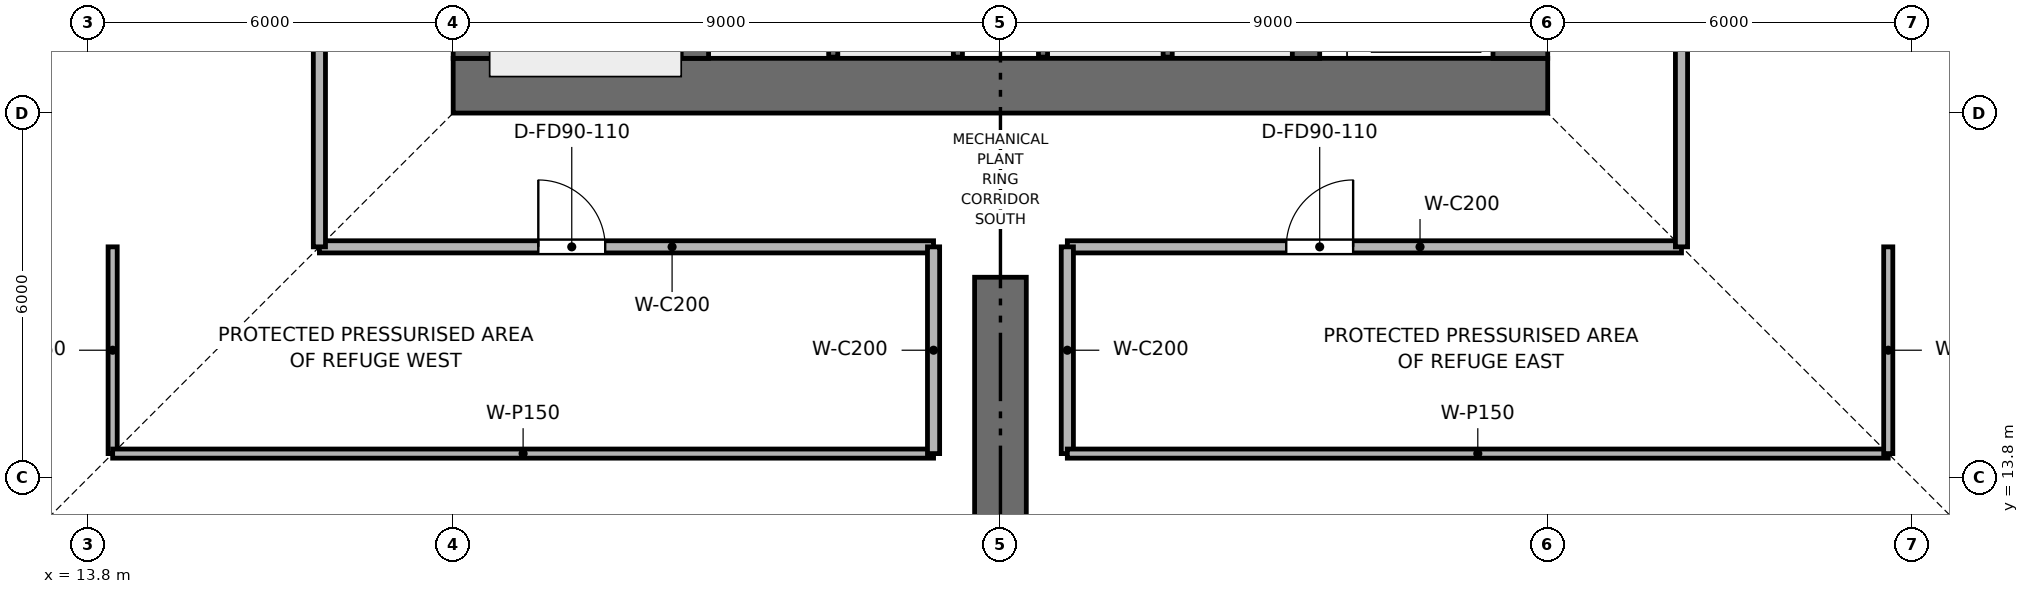
"""IFC4 building model, lengths in metres.
Left out: names, types, materials, properties, quantities, classifications, styles, units other than length and angle.
Written with IfcOpenShell. Run it as: python <this file> out.ifc"""

import sys

from ifc_helpers import new_model, si_unit, direction, frame, frame_2d, origin, place, context, subcontext, project, spatial, rectangle, extrude, element, fill, save


model = new_model("IFC4")
c1 = context("Model", 3, precision=1e-05, world=origin(), true_north=direction((0.0, 1.0)))
c2 = subcontext(c1, "Body", "Model", "MODEL_VIEW")
j1 = project(units=[si_unit("LENGTHUNIT", "METRE"), si_unit("PLANEANGLEUNIT", "RADIAN")], contexts=[c1])
p1 = place(None, origin())
s1 = spatial("IfcSite", under=j1, at=p1, CompositionType="ELEMENT")
p2 = place(p1, origin())
s2 = spatial("IfcBuilding", under=s1, at=p2, CompositionType="ELEMENT")
p3 = place(p2, frame((0.0, 0.0, 108.0)))
s3 = spatial("IfcBuildingStorey", under=s2, at=p3, CompositionType="ELEMENT", Elevation=108.0)
p4 = place(p3, frame((19.8, 20.25, 0.0), z_axis=(0.0, 0.0, 1.0), x_axis=(1.0, 0.0, 0.0)))
e1 = element("IfcWall", 1, at=p4, inside=s3, PredefinedType="SHEAR", context=c2, shape_type="SweptSolid", body=[
    extrude(rectangle(XDim=18.0, YDim=0.9, at=frame_2d((9.0, 0.0))), origin(), (0.0, 0.0, 1.0), 5.4),
])
p5 = place(p3, frame((20.25, 20.7, 0.0), z_axis=(0.0, 0.0, 1.0), x_axis=(0.0, 1.0, 0.0)))
e2 = element("IfcWall", 2, at=p5, inside=s3, PredefinedType="SHEAR", context=c2, shape_type="SweptSolid", body=[
    extrude(rectangle(XDim=16.2, YDim=0.9, at=frame_2d((8.1, 0.0))), origin(), (0.0, 0.0, 1.0), 5.4),
])
p6 = place(p5, frame((10.1, 0.0, 0.0)))
e3 = element("IfcOpeningElement", 3, at=p6, cuts=e2, PredefinedType="OPENING", context=c2, shape_type="SweptSolid", body=[
    extrude(rectangle(XDim=1.1, YDim=2.15, at=frame_2d((0.55, 1.075))), frame((0.0, 0.46, 0.0), z_axis=(0.0, -1.0, 0.0), x_axis=(1.0, 0.0, 0.0)), (0.0, 0.0, 1.0), 0.92),
])
p7 = place(p3, frame((37.35, 20.7, 0.0), z_axis=(0.0, 0.0, 1.0), x_axis=(0.0, 1.0, 0.0)))
e4 = element("IfcWall", 4, at=p7, inside=s3, PredefinedType="SHEAR", context=c2, shape_type="SweptSolid", body=[
    extrude(rectangle(XDim=16.2, YDim=0.9, at=frame_2d((8.1, 0.0))), origin(), (0.0, 0.0, 1.0), 5.4),
])
p8 = place(p7, frame((4.6, 0.0, 0.0)))
e5 = element("IfcOpeningElement", 5, at=p8, cuts=e4, PredefinedType="OPENING", context=c2, shape_type="SweptSolid", body=[
    extrude(rectangle(XDim=1.1, YDim=2.15, at=frame_2d((0.55, 1.075))), frame((0.0, 0.46, 0.0), z_axis=(0.0, -1.0, 0.0), x_axis=(1.0, 0.0, 0.0)), (0.0, 0.0, 1.0), 0.92),
])
for number, where, z_axis, x_axis in (
    (6, (23.775, 20.7, 0.0), (0.0, 0.0, 1.0), (0.0, 1.0, 0.0)),
    (7, (33.825, 20.7, 0.0), (0.0, 0.0, 1.0), (0.0, 1.0, 0.0)),
):
    element("IfcWall", number, at=place(p3, frame(where, z_axis=z_axis, x_axis=x_axis)), inside=s3, PredefinedType="SHEAR", context=c2, shape_type="SweptSolid", body=[
        extrude(rectangle(XDim=16.2, YDim=0.45, at=frame_2d((8.1, 0.0))), origin(), (0.0, 0.0, 1.0), 5.4),
    ])
p9 = place(p3, frame((28.8, 17.1, 0.0), z_axis=(0.0, 0.0, 1.0), x_axis=(0.0, -1.0, 0.0)))
e8 = element("IfcWall", 8, at=p9, inside=s3, PredefinedType="SHEAR", context=c2, shape_type="SweptSolid", body=[
    extrude(rectangle(XDim=12.55, YDim=0.85, at=frame_2d((6.275, 0.0))), origin(), (0.0, 0.0, 1.0), 5.15),
])
for number, where, z_axis, x_axis in (
    (9, (26.05, 20.72, 0.0), (0.0, 0.0, 1.0), (0.0, 1.0, 0.0)),
    (10, (28.1, 20.72, 0.0), (0.0, 0.0, 1.0), (0.0, 1.0, 0.0)),
    (11, (29.5, 20.72, 0.0), (0.0, 0.0, 1.0), (0.0, 1.0, 0.0)),
    (12, (31.55, 20.72, 0.0), (0.0, 0.0, 1.0), (0.0, 1.0, 0.0)),
):
    element("IfcWall", number, at=place(p3, frame(where, z_axis=z_axis, x_axis=x_axis)), inside=s3, PredefinedType="SHEAR", context=c2, shape_type="SweptSolid", body=[
        extrude(rectangle(XDim=2.26, YDim=0.15, at=frame_2d((1.13, 0.0))), origin(), (0.0, 0.0, 1.0), 5.15),
    ])
p10 = place(p3, frame((17.6, 17.6, 0.0), z_axis=(0.0, 0.0, 1.0), x_axis=(1.0, 0.0, 0.0)))
e13 = element("IfcWall", 13, at=p10, inside=s3, PredefinedType="PARTITIONING", context=c2, shape_type="SweptSolid", body=[
    extrude(rectangle(XDim=10.1, YDim=0.2, at=frame_2d((5.05, 0.0))), origin(), (0.0, 0.0, 1.0), 4.685),
])
p11 = place(p10, frame((3.6, 0.0, 0.0)))
e14 = element("IfcOpeningElement", 14, at=p11, cuts=e13, PredefinedType="OPENING", context=c2, shape_type="SweptSolid", body=[
    extrude(rectangle(XDim=1.1, YDim=2.15, at=frame_2d((0.55, 1.075))), frame((0.0, 0.11, 0.0), z_axis=(0.0, -1.0, 0.0), x_axis=(1.0, 0.0, 0.0)), (0.0, 0.0, 1.0), 0.22),
])
p12 = place(p3, frame((29.9, 17.6, 0.0), z_axis=(0.0, 0.0, 1.0), x_axis=(1.0, 0.0, 0.0)))
e15 = element("IfcWall", 15, at=p12, inside=s3, PredefinedType="PARTITIONING", context=c2, shape_type="SweptSolid", body=[
    extrude(rectangle(XDim=10.1, YDim=0.2, at=frame_2d((5.05, 0.0))), origin(), (0.0, 0.0, 1.0), 4.685),
])
p13 = place(p12, frame((3.6, 0.0, 0.0)))
e16 = element("IfcOpeningElement", 16, at=p13, cuts=e15, PredefinedType="OPENING", context=c2, shape_type="SweptSolid", body=[
    extrude(rectangle(XDim=1.1, YDim=2.15, at=frame_2d((0.55, 1.075))), frame((0.0, 0.11, 0.0), z_axis=(0.0, -1.0, 0.0), x_axis=(1.0, 0.0, 0.0)), (0.0, 0.0, 1.0), 0.22),
])
for number, where, z_axis, x_axis in (
    (17, (17.6, 17.6, 0.0), (0.0, 0.0, 1.0), (0.0, 1.0, 0.0)),
    (18, (40.0, 17.6, 0.0), (0.0, 0.0, 1.0), (0.0, 1.0, 0.0)),
):
    element("IfcWall", number, at=place(p3, frame(where, z_axis=z_axis, x_axis=x_axis)), inside=s3, PredefinedType="PARTITIONING", context=c2, shape_type="SweptSolid", body=[
        extrude(rectangle(XDim=10.1, YDim=0.2, at=frame_2d((5.05, 0.0))), origin(), (0.0, 0.0, 1.0), 4.685),
    ])
p14 = place(p3, frame((14.2, 14.2, 0.0), z_axis=(0.0, 0.0, 1.0), x_axis=(0.0, 1.0, 0.0)))
e19 = element("IfcWall", 19, at=p14, inside=s3, PredefinedType="PARTITIONING", context=c2, shape_type="SweptSolid", body=[
    extrude(rectangle(XDim=3.4, YDim=0.15, at=frame_2d((1.7, 0.0))), origin(), (0.0, 0.0, 1.0), 4.685),
])
p15 = place(p3, frame((14.2, 14.2, 0.0), z_axis=(0.0, 0.0, 1.0), x_axis=(1.0, 0.0, 0.0)))
e20 = element("IfcWall", 20, at=p15, inside=s3, PredefinedType="PARTITIONING", context=c2, shape_type="SweptSolid", body=[
    extrude(rectangle(XDim=13.5, YDim=0.15, at=frame_2d((6.75, 0.0))), origin(), (0.0, 0.0, 1.0), 4.685),
])
for number, where, z_axis, x_axis in (
    (21, (27.7, 14.2, 0.0), (0.0, 0.0, 1.0), (0.0, 1.0, 0.0)),
    (22, (29.9, 14.2, 0.0), (0.0, 0.0, 1.0), (0.0, 1.0, 0.0)),
):
    element("IfcWall", number, at=place(p3, frame(where, z_axis=z_axis, x_axis=x_axis)), inside=s3, PredefinedType="PARTITIONING", context=c2, shape_type="SweptSolid", body=[
        extrude(rectangle(XDim=3.4, YDim=0.2, at=frame_2d((1.7, 0.0))), origin(), (0.0, 0.0, 1.0), 4.775),
    ])
p16 = place(p3, frame((29.9, 14.2, 0.0), z_axis=(0.0, 0.0, 1.0), x_axis=(1.0, 0.0, 0.0)))
e23 = element("IfcWall", 23, at=p16, inside=s3, PredefinedType="PARTITIONING", context=c2, shape_type="SweptSolid", body=[
    extrude(rectangle(XDim=13.5, YDim=0.15, at=frame_2d((6.75, 0.0))), origin(), (0.0, 0.0, 1.0), 4.685),
])
p17 = place(p3, frame((43.4, 14.2, 0.0), z_axis=(0.0, 0.0, 1.0), x_axis=(0.0, 1.0, 0.0)))
e24 = element("IfcWall", 24, at=p17, inside=s3, PredefinedType="PARTITIONING", context=c2, shape_type="SweptSolid", body=[
    extrude(rectangle(XDim=3.4, YDim=0.15, at=frame_2d((1.7, 0.0))), origin(), (0.0, 0.0, 1.0), 4.685),
])
p18 = place(p11, origin())
e25 = element("IfcDoor", 25, at=p18, inside=s3, OperationType="SINGLE_SWING_LEFT", PredefinedType="DOOR", context=c2, shape_type="SweptSolid", body=[
    extrude(rectangle(XDim=1.1, YDim=2.15, at=frame_2d((0.55, 1.075))), frame((0.0, 0.025, 0.0), z_axis=(0.0, -1.0, 0.0), x_axis=(1.0, 0.0, 0.0)), (0.0, 0.0, 1.0), 0.05),
])
fill(e14, e25)
p19 = place(p13, origin())
e26 = element("IfcDoor", 26, at=p19, inside=s3, OperationType="SINGLE_SWING_RIGHT", PredefinedType="DOOR", context=c2, shape_type="SweptSolid", body=[
    extrude(rectangle(XDim=1.1, YDim=2.15, at=frame_2d((0.55, 1.075))), frame((0.0, 0.025, 0.0), z_axis=(0.0, -1.0, 0.0), x_axis=(1.0, 0.0, 0.0)), (0.0, 0.0, 1.0), 0.05),
])
fill(e16, e26)
save(model, sys.argv[1])
